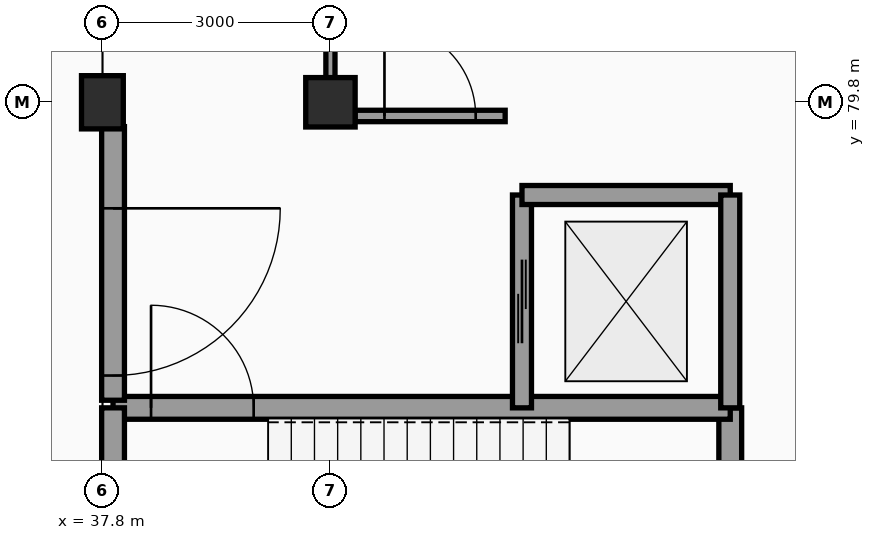
"""IFC4 building model, lengths in metres.
Left out: names, types, materials, properties, quantities, classifications, styles, units other than length and angle.
Written with IfcOpenShell. Run it as: python <this file> out.ifc"""

import sys

from ifc_helpers import new_model, si_unit, direction, frame, frame_2d, origin, origin_2d, place, context, subcontext, project, spatial, rectangle, extrude, element, fill, save


model = new_model("IFC4")
c1 = context("Model", 3, precision=1e-05, world=origin(), true_north=direction((0.0, 1.0)))
c2 = subcontext(c1, "Body", "Model", "MODEL_VIEW")
j1 = project(units=[si_unit("LENGTHUNIT", "METRE"), si_unit("PLANEANGLEUNIT", "RADIAN")], contexts=[c1])
p1 = place(None, origin())
s1 = spatial("IfcSite", under=j1, at=p1, CompositionType="ELEMENT")
p2 = place(p1, origin())
s2 = spatial("IfcBuilding", under=s1, at=p2, CompositionType="ELEMENT")
p3 = place(p2, origin())
s3 = spatial("IfcBuildingStorey", under=s2, at=p3, CompositionType="ELEMENT", Elevation=0.0)
p4 = place(p3, frame((37.8, 79.8, -0.4), z_axis=(0.0, 0.0, 1.0), x_axis=(1.0, 0.0, 0.0)))
e1 = element("IfcColumn", 1, at=p4, inside=s3, PredefinedType="COLUMN", context=c2, shape_type="SweptSolid", body=[
    extrude(rectangle(XDim=0.55, YDim=0.7, at=origin_2d()), origin(), (0.0, 0.0, 1.0), 4.6),
])
p5 = place(p3, frame((40.8, 79.8, -0.4), z_axis=(0.0, 0.0, 1.0), x_axis=(1.0, 0.0, 0.0)))
e2 = element("IfcColumn", 2, at=p5, inside=s3, PredefinedType="COLUMN", context=c2, shape_type="SweptSolid", body=[
    extrude(rectangle(XDim=0.65, YDim=0.65, at=origin_2d()), origin(), (0.0, 0.0, 1.0), 4.6),
])
p6 = place(p3, frame((46.06, 71.54, -0.4), z_axis=(0.0, 0.0, 1.0), x_axis=(0.0, 1.0, 0.0)))
e3 = element("IfcWall", 3, at=p6, inside=s3, PredefinedType="SHEAR", context=c2, shape_type="SweptSolid", body=[
    extrude(rectangle(XDim=4.24, YDim=0.3, at=frame_2d((2.12, 0.0))), origin(), (0.0, 0.0, 1.0), 4.6),
])
p7 = place(p3, frame((46.06, 75.78, -0.4), z_axis=(0.0, 0.0, 1.0), x_axis=(-1.0, 0.0, 0.0)))
e4 = element("IfcWall", 4, at=p7, inside=s3, PredefinedType="SHEAR", context=c2, shape_type="SweptSolid", body=[
    extrude(rectangle(XDim=8.12, YDim=0.3, at=frame_2d((4.06, 0.0))), origin(), (0.0, 0.0, 1.0), 4.6),
])
p8 = place(p7, frame((6.27, 0.0, 0.4)))
e5 = element("IfcOpeningElement", 5, at=p8, cuts=e4, PredefinedType="OPENING", context=c2, shape_type="SweptSolid", body=[
    extrude(rectangle(XDim=1.35, YDim=2.15, at=frame_2d((0.675, 1.075))), frame((0.0, 0.16, 0.0), z_axis=(0.0, -1.0, 0.0), x_axis=(1.0, 0.0, 0.0)), (0.0, 0.0, 1.0), 0.32),
])
p9 = place(p3, frame((37.94, 75.78, -0.4), z_axis=(0.0, 0.0, 1.0), x_axis=(0.0, -1.0, 0.0)))
e6 = element("IfcWall", 6, at=p9, inside=s3, PredefinedType="SHEAR", context=c2, shape_type="SweptSolid", body=[
    extrude(rectangle(XDim=4.24, YDim=0.3, at=frame_2d((2.12, 0.0))), origin(), (0.0, 0.0, 1.0), 4.6),
])
p10 = place(p3, frame((43.32, 78.58, -0.4), z_axis=(0.0, 0.0, 1.0), x_axis=(0.0, -1.0, 0.0)))
e7 = element("IfcWall", 7, at=p10, inside=s3, PredefinedType="SHEAR", context=c2, shape_type="SweptSolid", body=[
    extrude(rectangle(XDim=2.8, YDim=0.25, at=frame_2d((1.4, 0.0))), origin(), (0.0, 0.0, 1.0), 4.6),
])
p11 = place(p10, frame((0.85, 0.0, 0.4)))
e8 = element("IfcOpeningElement", 8, at=p11, cuts=e7, PredefinedType="OPENING", context=c2, shape_type="SweptSolid", body=[
    extrude(rectangle(XDim=1.1, YDim=2.15, at=frame_2d((0.55, 1.075))), frame((0.0, 0.135, 0.0), z_axis=(0.0, -1.0, 0.0), x_axis=(1.0, 0.0, 0.0)), (0.0, 0.0, 1.0), 0.27),
])
p12 = place(p3, frame((46.06, 78.58, -0.4), z_axis=(0.0, 0.0, 1.0), x_axis=(-1.0, 0.0, 0.0)))
e9 = element("IfcWall", 9, at=p12, inside=s3, PredefinedType="SHEAR", context=c2, shape_type="SweptSolid", body=[
    extrude(rectangle(XDim=2.74, YDim=0.25, at=frame_2d((1.37, 0.0))), origin(), (0.0, 0.0, 1.0), 4.6),
])
p13 = place(p3, frame((46.06, 75.78, -0.4), z_axis=(0.0, 0.0, 1.0), x_axis=(0.0, 1.0, 0.0)))
e10 = element("IfcWall", 10, at=p13, inside=s3, PredefinedType="SHEAR", context=c2, shape_type="SweptSolid", body=[
    extrude(rectangle(XDim=2.8, YDim=0.25, at=frame_2d((1.4, 0.0))), origin(), (0.0, 0.0, 1.0), 4.6),
])
p14 = place(p3, frame((37.94, 79.48, -0.4), z_axis=(0.0, 0.0, 1.0), x_axis=(0.0, -1.0, 0.0)))
e11 = element("IfcWall", 11, at=p14, inside=s3, PredefinedType="SHEAR", context=c2, shape_type="SweptSolid", body=[
    extrude(rectangle(XDim=3.6, YDim=0.3, at=frame_2d((1.8, 0.0))), origin(), (0.0, 0.0, 1.0), 4.32),
])
p15 = place(p14, frame((1.075, 0.0, 0.4)))
e12 = element("IfcOpeningElement", 12, at=p15, cuts=e11, PredefinedType="OPENING", context=c2, shape_type="SweptSolid", body=[
    extrude(rectangle(XDim=2.2, YDim=2.35, at=frame_2d((1.1, 1.175))), frame((0.0, 0.16, 0.0), z_axis=(0.0, -1.0, 0.0), x_axis=(1.0, 0.0, 0.0)), (0.0, 0.0, 1.0), 0.32),
])
p16 = place(p3, frame((43.099, 79.62, 0.0), z_axis=(0.0, 0.0, 1.0), x_axis=(-1.0, 0.0, 0.0)))
e13 = element("IfcWall", 13, at=p16, inside=s3, PredefinedType="PARTITIONING", context=c2, shape_type="SweptSolid", body=[
    extrude(rectangle(XDim=1.976, YDim=0.15, at=frame_2d((0.988, 0.0))), origin(), (0.0, 0.0, 1.0), 3.12),
])
p17 = place(p16, frame((0.388, 0.0, 0.0)))
e14 = element("IfcOpeningElement", 14, at=p17, cuts=e13, PredefinedType="OPENING", context=c2, shape_type="SweptSolid", body=[
    extrude(rectangle(XDim=1.2, YDim=2.15, at=frame_2d((0.6, 1.075))), frame((0.0, 0.085, 0.0), z_axis=(0.0, -1.0, 0.0), x_axis=(1.0, 0.0, 0.0)), (0.0, 0.0, 1.0), 0.17),
])
p18 = place(p3, frame((40.8, 80.123, 0.0), z_axis=(0.0, 0.0, 1.0), x_axis=(0.0, 1.0, 0.0)))
e15 = element("IfcWall", 15, at=p18, inside=s3, PredefinedType="PARTITIONING", context=c2, shape_type="SweptSolid", body=[
    extrude(rectangle(XDim=7.754, YDim=0.12, at=frame_2d((3.877, 0.0))), origin(), (0.0, 0.0, 1.0), 3.56),
])
p19 = place(p8, origin())
e16 = element("IfcDoor", 16, at=p19, inside=s3, OperationType="SINGLE_SWING_RIGHT", PredefinedType="DOOR", context=c2, shape_type="SweptSolid", body=[
    extrude(rectangle(XDim=1.35, YDim=2.15, at=frame_2d((0.675, 1.075))), frame((0.0, 0.025, 0.0), z_axis=(0.0, -1.0, 0.0), x_axis=(1.0, 0.0, 0.0)), (0.0, 0.0, 1.0), 0.05),
])
fill(e5, e16)
p20 = place(p11, origin())
e17 = element("IfcDoor", 17, at=p20, inside=s3, OperationType="DOUBLE_DOOR_SLIDING", PredefinedType="DOOR", context=c2, shape_type="SweptSolid", body=[
    extrude(rectangle(XDim=1.1, YDim=2.15, at=frame_2d((0.55, 1.075))), frame((0.0, 0.025, 0.0), z_axis=(0.0, -1.0, 0.0), x_axis=(1.0, 0.0, 0.0)), (0.0, 0.0, 1.0), 0.05),
])
fill(e8, e17)
p21 = place(p15, origin())
e18 = element("IfcDoor", 18, at=p21, inside=s3, OperationType="SINGLE_SWING_LEFT", PredefinedType="DOOR", context=c2, shape_type="SweptSolid", body=[
    extrude(rectangle(XDim=2.2, YDim=2.35, at=frame_2d((1.1, 1.175))), frame((0.0, 0.025, 0.0), z_axis=(0.0, -1.0, 0.0), x_axis=(1.0, 0.0, 0.0)), (0.0, 0.0, 1.0), 0.05),
])
fill(e12, e18)
p22 = place(p17, origin())
e19 = element("IfcDoor", 19, at=p22, inside=s3, OperationType="SINGLE_SWING_RIGHT", PredefinedType="DOOR", context=c2, shape_type="SweptSolid", body=[
    extrude(rectangle(XDim=1.2, YDim=2.15, at=frame_2d((0.6, 1.075))), frame((0.0, 0.025, 0.0), z_axis=(0.0, -1.0, 0.0), x_axis=(1.0, 0.0, 0.0)), (0.0, 0.0, 1.0), 0.05),
])
fill(e14, e19)
save(model, sys.argv[1])
